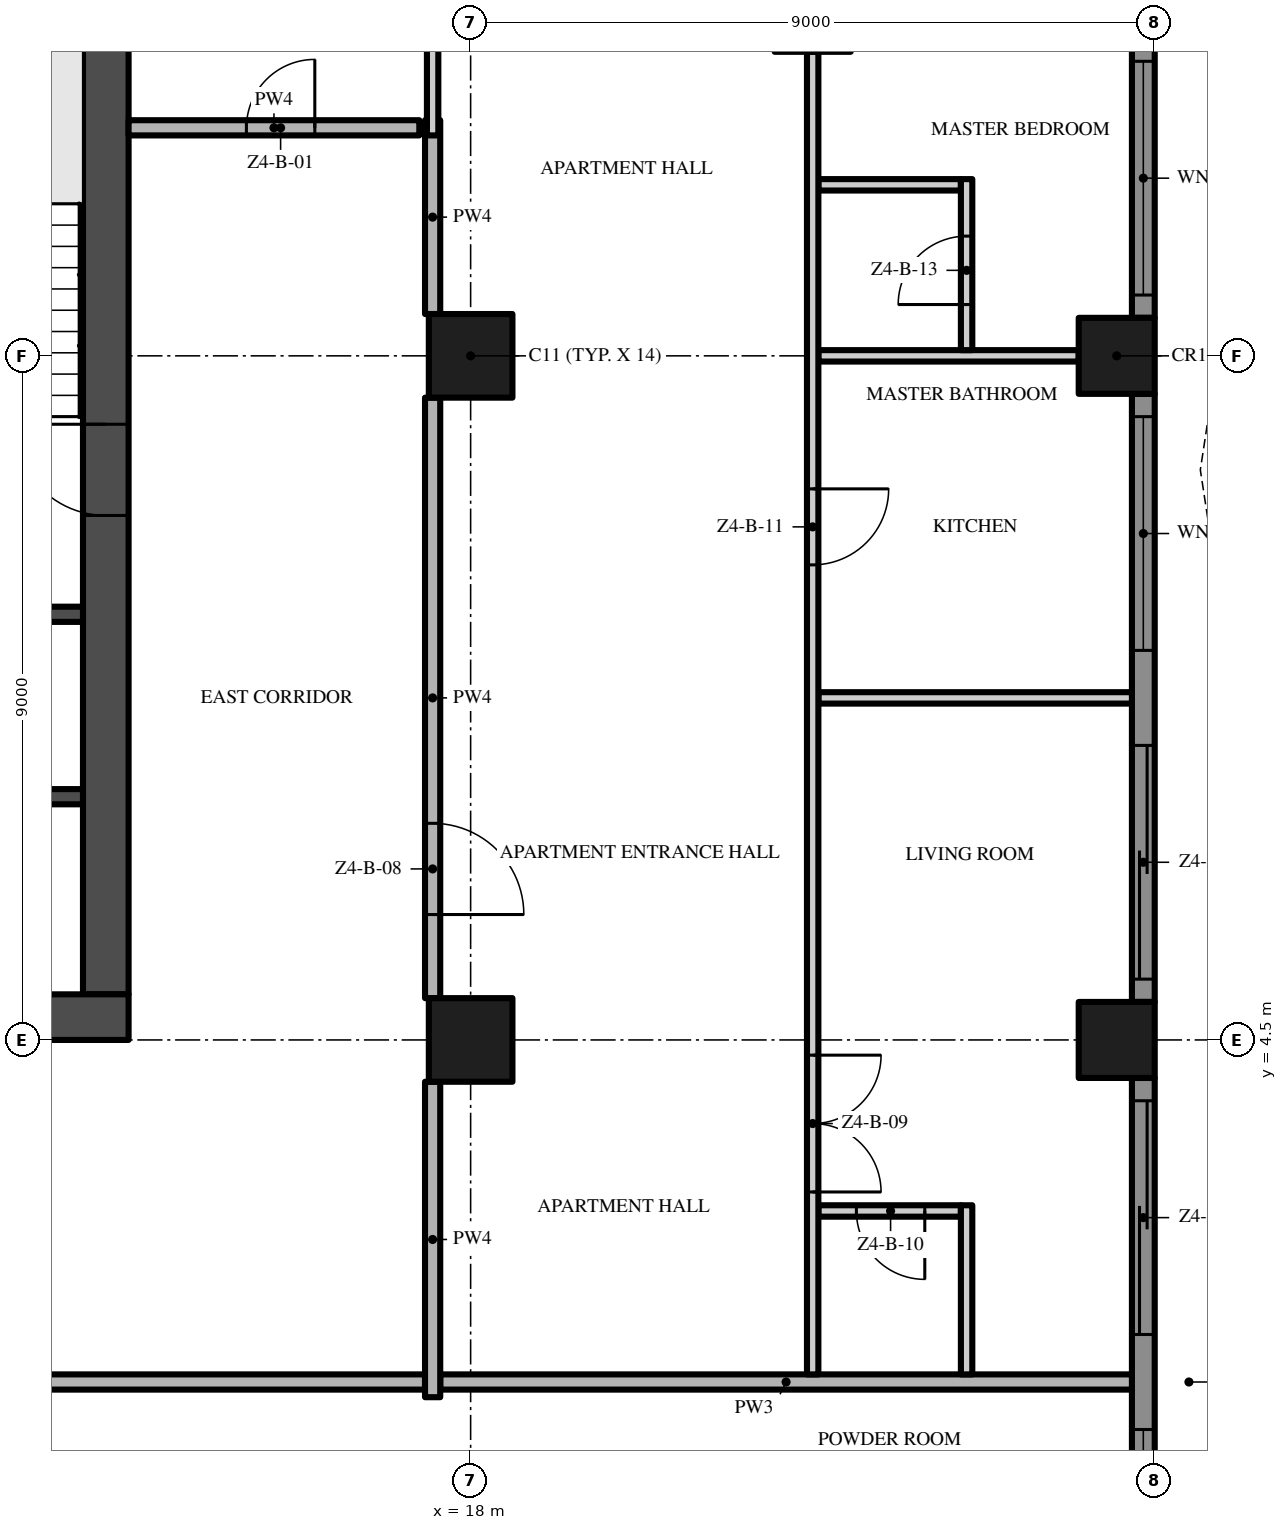
"""IFC4 building model, lengths in metres.
Left out: names, types, materials, properties, quantities, classifications, styles, units other than length and angle.
Written with IfcOpenShell. Run it as: python <this file> out.ifc"""

import sys

from ifc_helpers import new_model, si_unit, direction, frame, frame_2d, origin, origin_2d, place, context, subcontext, project, spatial, polyline, rectangle, outline, extrude, element, fill, save


model = new_model("IFC4")
c1 = context("Model", 3, precision=1e-05, world=origin(), true_north=direction((0.0, 1.0)))
c2 = subcontext(c1, "Body", "Model", "MODEL_VIEW")
j1 = project(units=[si_unit("LENGTHUNIT", "METRE"), si_unit("PLANEANGLEUNIT", "RADIAN")], contexts=[c1])
p1 = place(None, origin())
s1 = spatial("IfcSite", under=j1, at=p1, CompositionType="ELEMENT")
p2 = place(p1, origin())
s2 = spatial("IfcBuilding", under=s1, at=p2, CompositionType="ELEMENT")
p3 = place(p2, frame((0.0, 0.0, 203.4)))
s3 = spatial("IfcBuildingStorey", under=s2, at=p3, CompositionType="ELEMENT", Elevation=203.4)
p4 = place(p3, frame((-13.5, 4.8, -0.3), z_axis=(0.0, 0.0, 1.0), x_axis=(1.0, 0.0, 0.0)))
e1 = element("IfcWall", 1, at=p4, inside=s3, PredefinedType="SHEAR", context=c2, shape_type="SweptSolid", body=[
    extrude(rectangle(XDim=27.0, YDim=0.6, at=frame_2d((13.5, 0.0))), origin(), (0.0, 0.0, 1.0), 3.8),
])
p5 = place(p4, frame((12.0, 0.0, 0.3)))
e2 = element("IfcOpeningElement", 2, at=p5, cuts=e1, PredefinedType="OPENING", context=c2, shape_type="SweptSolid", body=[
    extrude(rectangle(XDim=3.0, YDim=2.4, at=frame_2d((1.5, 1.2))), frame((0.0, 0.31, 0.0), z_axis=(0.0, -1.0, 0.0), x_axis=(1.0, 0.0, 0.0)), (0.0, 0.0, 1.0), 0.62),
])
p6 = place(p4, frame((4.9, 0.0, 0.3)))
e3 = element("IfcOpeningElement", 3, at=p6, cuts=e1, PredefinedType="OPENING", context=c2, shape_type="SweptSolid", body=[
    extrude(rectangle(XDim=1.2, YDim=2.2, at=frame_2d((0.6, 1.1))), frame((0.0, 0.31, 0.0), z_axis=(0.0, -1.0, 0.0), x_axis=(1.0, 0.0, 0.0)), (0.0, 0.0, 1.0), 0.62),
])
p7 = place(p4, frame((20.75, 0.0, 0.3)))
e4 = element("IfcOpeningElement", 4, at=p7, cuts=e1, PredefinedType="OPENING", context=c2, shape_type="SweptSolid", body=[
    extrude(rectangle(XDim=1.5, YDim=2.2, at=frame_2d((0.75, 1.1))), frame((0.0, 0.31, 0.0), z_axis=(0.0, -1.0, 0.0), x_axis=(1.0, 0.0, 0.0)), (0.0, 0.0, 1.0), 0.62),
])
p8 = place(p4, frame((17.4, 0.0, 0.3)))
e5 = element("IfcOpeningElement", 5, at=p8, cuts=e1, PredefinedType="OPENING", context=c2, shape_type="SweptSolid", body=[
    extrude(rectangle(XDim=1.2, YDim=2.2, at=frame_2d((0.6, 1.1))), frame((0.0, 0.31, 0.0), z_axis=(0.0, -1.0, 0.0), x_axis=(1.0, 0.0, 0.0)), (0.0, 0.0, 1.0), 0.62),
])
p9 = place(p3, frame((13.2, 5.1, -0.3), z_axis=(0.0, 0.0, 1.0), x_axis=(0.0, 1.0, 0.0)))
e6 = element("IfcWall", 6, at=p9, inside=s3, PredefinedType="SHEAR", context=c2, shape_type="SweptSolid", body=[
    extrude(rectangle(XDim=16.8, YDim=0.6, at=frame_2d((8.4, 0.0))), origin(), (0.0, 0.0, 1.0), 3.8),
])
p10 = place(p9, frame((6.3, 0.0, 0.3)))
e7 = element("IfcOpeningElement", 7, at=p10, cuts=e6, PredefinedType="OPENING", context=c2, shape_type="SweptSolid", body=[
    extrude(rectangle(XDim=1.2, YDim=2.2, at=frame_2d((0.6, 1.1))), frame((0.0, 0.31, 0.0), z_axis=(0.0, -1.0, 0.0), x_axis=(1.0, 0.0, 0.0)), (0.0, 0.0, 1.0), 0.62),
])
for number, where, z_axis, x_axis in (
    (8, (18.0, 13.5, 0.0), (0.0, 0.0, 1.0), (1.0, 0.0, 0.0)),
    (9, (18.0, 4.5, 0.0), (0.0, 0.0, 1.0), (1.0, 0.0, 0.0)),
):
    element("IfcColumn", number, at=place(p3, frame(where, z_axis=z_axis, x_axis=x_axis)), inside=s3, PredefinedType="COLUMN", context=c2, shape_type="SweptSolid", body=[
        extrude(rectangle(XDim=1.1, YDim=1.1, at=origin_2d()), origin(), (0.0, 0.0, 1.0), 3.5),
    ])
for number, where, z_axis, x_axis in (
    (10, (26.5, 13.5, 0.0), (0.0, 0.0, 1.0), (1.0, 0.0, 0.0)),
    (11, (26.5, 4.5, 0.0), (0.0, 0.0, 1.0), (1.0, 0.0, 0.0)),
):
    element("IfcColumn", number, at=place(p3, frame(where, z_axis=z_axis, x_axis=x_axis)), inside=s3, PredefinedType="COLUMN", context=c2, shape_type="SweptSolid", body=[
        extrude(rectangle(XDim=1.0, YDim=1.0, at=origin_2d()), origin(), (0.0, 0.0, 1.0), 3.5),
    ])
p11 = place(p3, frame((26.85, 4.0, 0.0), z_axis=(0.0, 0.0, 1.0), x_axis=(0.0, -1.0, 0.0)))
e12 = element("IfcWall", 12, at=p11, inside=s3, PredefinedType="SOLIDWALL", context=c2, shape_type="SweptSolid", body=[
    extrude(rectangle(XDim=8.0, YDim=0.3, at=frame_2d((4.0, 0.0))), origin(), (0.0, 0.0, 1.0), 3.5),
])
p12 = place(p11, frame((4.625, 0.0, 0.45)))
e13 = element("IfcOpeningElement", 13, at=p12, cuts=e12, PredefinedType="OPENING", context=c2, shape_type="SweptSolid", body=[
    extrude(rectangle(XDim=3.075, YDim=2.65, at=frame_2d((1.538, 1.325))), frame((0.0, 0.16, 0.0), z_axis=(0.0, -1.0, 0.0), x_axis=(1.0, 0.0, 0.0)), (0.0, 0.0, 1.0), 0.32),
])
p13 = place(p11, frame((0.3, 0.0, 0.0)))
e14 = element("IfcOpeningElement", 14, at=p13, cuts=e12, PredefinedType="OPENING", context=c2, shape_type="SweptSolid", body=[
    extrude(rectangle(XDim=3.075, YDim=2.4, at=frame_2d((1.538, 1.2))), frame((0.0, 0.16, 0.0), z_axis=(0.0, -1.0, 0.0), x_axis=(1.0, 0.0, 0.0)), (0.0, 0.0, 1.0), 0.32),
])
p14 = place(p3, frame((26.85, 13.0, 0.0), z_axis=(0.0, 0.0, 1.0), x_axis=(0.0, -1.0, 0.0)))
e15 = element("IfcWall", 15, at=p14, inside=s3, PredefinedType="SOLIDWALL", context=c2, shape_type="SweptSolid", body=[
    extrude(rectangle(XDim=8.0, YDim=0.3, at=frame_2d((4.0, 0.0))), origin(), (0.0, 0.0, 1.0), 3.5),
])
p15 = place(p14, frame((4.625, 0.0, 0.0)))
e16 = element("IfcOpeningElement", 16, at=p15, cuts=e15, PredefinedType="OPENING", context=c2, shape_type="SweptSolid", body=[
    extrude(rectangle(XDim=3.075, YDim=2.4, at=frame_2d((1.538, 1.2))), frame((0.0, 0.16, 0.0), z_axis=(0.0, -1.0, 0.0), x_axis=(1.0, 0.0, 0.0)), (0.0, 0.0, 1.0), 0.32),
])
p16 = place(p14, frame((0.3, 0.0, 0.45)))
e17 = element("IfcOpeningElement", 17, at=p16, cuts=e15, PredefinedType="OPENING", context=c2, shape_type="SweptSolid", body=[
    extrude(rectangle(XDim=3.075, YDim=2.65, at=frame_2d((1.538, 1.325))), frame((0.0, 0.16, 0.0), z_axis=(0.0, -1.0, 0.0), x_axis=(1.0, 0.0, 0.0)), (0.0, 0.0, 1.0), 0.32),
])
p17 = place(p3, frame((26.85, 18.0, 0.0), z_axis=(0.0, 0.0, 1.0), x_axis=(0.0, -1.0, 0.0)))
e18 = element("IfcWall", 18, at=p17, inside=s3, PredefinedType="SOLIDWALL", context=c2, shape_type="SweptSolid", body=[
    extrude(rectangle(XDim=4.0, YDim=0.3, at=frame_2d((2.0, 0.0))), origin(), (0.0, 0.0, 1.0), 3.5),
])
p18 = place(p17, frame((0.625, 0.0, 0.45)))
e19 = element("IfcOpeningElement", 19, at=p18, cuts=e18, PredefinedType="OPENING", context=c2, shape_type="SweptSolid", body=[
    extrude(rectangle(XDim=3.075, YDim=2.65, at=frame_2d((1.538, 1.325))), frame((0.0, 0.16, 0.0), z_axis=(0.0, -1.0, 0.0), x_axis=(1.0, 0.0, 0.0)), (0.0, 0.0, 1.0), 0.32),
])
p19 = place(p3, origin())
e20 = element("IfcWall", 20, at=p19, inside=s3, PredefinedType="USERDEFINED", context=c2, shape_type="SweptSolid", body=[
    extrude(outline(polyline([(27.6, -18.0), (27.829, -16.5), (28.429, -15.0), (29.171, -13.5), (29.771, -12.0), (30.0, -10.5), (29.771, -9.0), (29.171, -7.5), (28.429, -6.0), (27.829, -4.5), (27.6, -3.0), (27.829, -1.5), (28.429, 0.0), (29.171, 1.5), (29.771, 3.0), (30.0, 4.5), (29.771, 6.0), (29.171, 7.5), (28.429, 9.0), (27.829, 10.5), (27.6, 12.0), (27.829, 13.5), (28.429, 15.0), (29.171, 16.5), (29.771, 18.0), (29.539, 18.093), (28.942, 16.602), (28.201, 15.102), (27.586, 13.566), (27.347, 12.0), (27.586, 10.434), (28.201, 8.898), (28.942, 7.398), (29.528, 5.934), (29.747, 4.5), (29.528, 3.066), (28.942, 1.602), (28.201, 0.102), (27.586, -1.434), (27.347, -3.0), (27.586, -4.566), (28.201, -6.102), (28.942, -7.602), (29.528, -9.066), (29.747, -10.5), (29.528, -11.934), (28.942, -13.398), (28.201, -14.898), (27.586, -16.434), (27.353, -17.962), (27.6, -18.0)])), origin(), (0.0, 0.0, 1.0), 0.9),
])
for number, where, z_axis, x_axis in (
    (21, (9.65, 7.7, 0.0), (0.0, 0.0, 1.0), (1.0, 0.0, 0.0)),
    (22, (9.65, 10.1, 0.0), (0.0, 0.0, 1.0), (1.0, 0.0, 0.0)),
):
    element("IfcWall", number, at=place(p3, frame(where, z_axis=z_axis, x_axis=x_axis)), inside=s3, PredefinedType="SHEAR", context=c2, shape_type="SweptSolid", body=[
        extrude(rectangle(XDim=3.25, YDim=0.2, at=frame_2d((1.625, 0.0))), origin(), (0.0, 0.0, 1.0), 3.5),
    ])
p20 = place(p3, frame((17.4, 0.0, 0.0), z_axis=(0.0, 0.0, 1.0), x_axis=(-1.0, 0.0, 0.0)))
e23 = element("IfcWall", 23, at=p20, inside=s3, PredefinedType="PARTITIONING", context=c2, shape_type="SweptSolid", body=[
    extrude(rectangle(XDim=17.3, YDim=0.2, at=frame_2d((8.65, 0.0))), origin(), (0.0, 0.0, 1.0), 3.5),
])
p21 = place(p20, frame((7.65, 0.0, 0.0)))
e24 = element("IfcOpeningElement", 24, at=p21, cuts=e23, PredefinedType="OPENING", context=c2, shape_type="SweptSolid", body=[
    extrude(rectangle(XDim=1.5, YDim=2.4, at=frame_2d((0.75, 1.2))), frame((0.0, 0.11, 0.0), z_axis=(0.0, -1.0, 0.0), x_axis=(1.0, 0.0, 0.0)), (0.0, 0.0, 1.0), 0.22),
])
p22 = place(p3, frame((17.6, 0.0, 0.0), z_axis=(0.0, 0.0, 1.0), x_axis=(1.0, 0.0, 0.0)))
e25 = element("IfcWall", 25, at=p22, inside=s3, PredefinedType="PARTITIONING", context=c2, shape_type="SweptSolid", body=[
    extrude(rectangle(XDim=9.1, YDim=0.2, at=frame_2d((4.55, 0.0))), origin(), (0.0, 0.0, 1.0), 3.5),
])
p23 = place(p3, frame((24.45, 2.25, 0.0), z_axis=(0.0, 0.0, 1.0), x_axis=(-1.0, 0.0, 0.0)))
e26 = element("IfcWall", 26, at=p23, inside=s3, PredefinedType="PARTITIONING", context=c2, shape_type="SweptSolid", body=[
    extrude(rectangle(XDim=1.875, YDim=0.15, at=frame_2d((0.938, 0.0))), origin(), (0.0, 0.0, 1.0), 3.5),
])
p24 = place(p23, frame((0.475, 0.0, 0.0)))
e27 = element("IfcOpeningElement", 27, at=p24, cuts=e26, PredefinedType="OPENING", context=c2, shape_type="SweptSolid", body=[
    extrude(rectangle(XDim=0.9, YDim=2.1, at=frame_2d((0.45, 1.05))), frame((0.0, 0.085, 0.0), z_axis=(0.0, -1.0, 0.0), x_axis=(1.0, 0.0, 0.0)), (0.0, 0.0, 1.0), 0.17),
])
p25 = place(p3, frame((22.575, 9.0, 0.0), z_axis=(0.0, 0.0, 1.0), x_axis=(1.0, 0.0, 0.0)))
e28 = element("IfcWall", 28, at=p25, inside=s3, PredefinedType="PARTITIONING", context=c2, shape_type="SweptSolid", body=[
    extrude(rectangle(XDim=4.125, YDim=0.15, at=frame_2d((2.062, 0.0))), origin(), (0.0, 0.0, 1.0), 3.5),
])
p26 = place(p3, frame((22.575, 13.5, 0.0), z_axis=(0.0, 0.0, 1.0), x_axis=(1.0, 0.0, 0.0)))
e29 = element("IfcWall", 29, at=p26, inside=s3, PredefinedType="PARTITIONING", context=c2, shape_type="SweptSolid", body=[
    extrude(rectangle(XDim=3.425, YDim=0.15, at=frame_2d((1.712, 0.0))), origin(), (0.0, 0.0, 1.0), 3.5),
])
p27 = place(p3, frame((22.575, 15.75, 0.0), z_axis=(0.0, 0.0, 1.0), x_axis=(1.0, 0.0, 0.0)))
e30 = element("IfcWall", 30, at=p27, inside=s3, PredefinedType="PARTITIONING", context=c2, shape_type="SweptSolid", body=[
    extrude(rectangle(XDim=1.875, YDim=0.15, at=frame_2d((0.938, 0.0))), origin(), (0.0, 0.0, 1.0), 3.5),
])
p28 = place(p3, frame((13.5, 16.5, 0.0), z_axis=(0.0, 0.0, 1.0), x_axis=(1.0, 0.0, 0.0)))
e31 = element("IfcWall", 31, at=p28, inside=s3, PredefinedType="PARTITIONING", context=c2, shape_type="SweptSolid", body=[
    extrude(rectangle(XDim=3.825, YDim=0.2, at=frame_2d((1.913, 0.0))), origin(), (0.0, 0.0, 1.0), 3.5),
])
p29 = place(p28, frame((1.55, 0.0, 0.0)))
e32 = element("IfcOpeningElement", 32, at=p29, cuts=e31, PredefinedType="OPENING", context=c2, shape_type="SweptSolid", body=[
    extrude(rectangle(XDim=0.9, YDim=2.1, at=frame_2d((0.45, 1.05))), frame((0.0, 0.11, 0.0), z_axis=(0.0, -1.0, 0.0), x_axis=(1.0, 0.0, 0.0)), (0.0, 0.0, 1.0), 0.22),
])
p30 = place(p3, frame((17.5, -0.2, 0.0), z_axis=(0.0, 0.0, 1.0), x_axis=(0.0, 1.0, 0.0)))
e33 = element("IfcWall", 33, at=p30, inside=s3, PredefinedType="PARTITIONING", context=c2, shape_type="SweptSolid", body=[
    extrude(rectangle(XDim=4.15, YDim=0.2, at=frame_2d((2.075, 0.0))), origin(), (0.0, 0.0, 1.0), 3.5),
])
p31 = place(p3, frame((17.5, 12.95, 0.0), z_axis=(0.0, 0.0, 1.0), x_axis=(0.0, -1.0, 0.0)))
e34 = element("IfcWall", 34, at=p31, inside=s3, PredefinedType="PARTITIONING", context=c2, shape_type="SweptSolid", body=[
    extrude(rectangle(XDim=7.9, YDim=0.2, at=frame_2d((3.95, 0.0))), origin(), (0.0, 0.0, 1.0), 3.5),
])
p32 = place(p31, frame((5.6, 0.0, 0.0)))
e35 = element("IfcOpeningElement", 35, at=p32, cuts=e34, PredefinedType="OPENING", context=c2, shape_type="SweptSolid", body=[
    extrude(rectangle(XDim=1.2, YDim=2.4, at=frame_2d((0.6, 1.2))), frame((0.0, 0.11, 0.0), z_axis=(0.0, -1.0, 0.0), x_axis=(1.0, 0.0, 0.0)), (0.0, 0.0, 1.0), 0.22),
])
p33 = place(p3, frame((17.5, 14.05, 0.0), z_axis=(0.0, 0.0, 1.0), x_axis=(0.0, 1.0, 0.0)))
e36 = element("IfcWall", 36, at=p33, inside=s3, PredefinedType="PARTITIONING", context=c2, shape_type="SweptSolid", body=[
    extrude(rectangle(XDim=2.55, YDim=0.2, at=frame_2d((1.275, 0.0))), origin(), (0.0, 0.0, 1.0), 3.5),
])
p34 = place(p3, frame((17.5, 16.4, 0.0), z_axis=(0.0, 0.0, 1.0), x_axis=(0.0, 1.0, 0.0)))
e37 = element("IfcWall", 37, at=p34, inside=s3, PredefinedType="PARTITIONING", context=c2, shape_type="SweptSolid", body=[
    extrude(rectangle(XDim=5.1, YDim=0.15, at=frame_2d((2.55, 0.0))), origin(), (0.0, 0.0, 1.0), 3.5),
])
p35 = place(p3, frame((22.5, 17.5, 0.0), z_axis=(0.0, 0.0, 1.0), x_axis=(0.0, -1.0, 0.0)))
e38 = element("IfcWall", 38, at=p35, inside=s3, PredefinedType="PARTITIONING", context=c2, shape_type="SweptSolid", body=[
    extrude(rectangle(XDim=17.4, YDim=0.15, at=frame_2d((8.7, 0.0))), origin(), (0.0, 0.0, 1.0), 3.5),
])
p36 = place(p35, frame((13.2, 0.0, 0.0)))
e39 = element("IfcOpeningElement", 39, at=p36, cuts=e38, PredefinedType="OPENING", context=c2, shape_type="SweptSolid", body=[
    extrude(rectangle(XDim=1.8, YDim=2.4, at=frame_2d((0.9, 1.2))), frame((0.0, 0.085, 0.0), z_axis=(0.0, -1.0, 0.0), x_axis=(1.0, 0.0, 0.0)), (0.0, 0.0, 1.0), 0.17),
])
p37 = place(p35, frame((5.75, 0.0, 0.0)))
e40 = element("IfcOpeningElement", 40, at=p37, cuts=e38, PredefinedType="OPENING", context=c2, shape_type="SweptSolid", body=[
    extrude(rectangle(XDim=1.0, YDim=2.4, at=frame_2d((0.5, 1.2))), frame((0.0, 0.085, 0.0), z_axis=(0.0, -1.0, 0.0), x_axis=(1.0, 0.0, 0.0)), (0.0, 0.0, 1.0), 0.17),
])
p38 = place(p3, frame((24.525, 0.1, 0.0), z_axis=(0.0, 0.0, 1.0), x_axis=(0.0, 1.0, 0.0)))
e41 = element("IfcWall", 41, at=p38, inside=s3, PredefinedType="PARTITIONING", context=c2, shape_type="SweptSolid", body=[
    extrude(rectangle(XDim=2.225, YDim=0.15, at=frame_2d((1.113, 0.0))), origin(), (0.0, 0.0, 1.0), 3.5),
])
p39 = place(p3, frame((24.525, 13.575, 0.0), z_axis=(0.0, 0.0, 1.0), x_axis=(0.0, 1.0, 0.0)))
e42 = element("IfcWall", 42, at=p39, inside=s3, PredefinedType="PARTITIONING", context=c2, shape_type="SweptSolid", body=[
    extrude(rectangle(XDim=2.25, YDim=0.15, at=frame_2d((1.125, 0.0))), origin(), (0.0, 0.0, 1.0), 3.5),
])
p40 = place(p39, frame((0.6, 0.0, 0.0)))
e43 = element("IfcOpeningElement", 43, at=p40, cuts=e42, PredefinedType="OPENING", context=c2, shape_type="SweptSolid", body=[
    extrude(rectangle(XDim=0.9, YDim=2.1, at=frame_2d((0.45, 1.05))), frame((0.0, 0.085, 0.0), z_axis=(0.0, -1.0, 0.0), x_axis=(1.0, 0.0, 0.0)), (0.0, 0.0, 1.0), 0.17),
])
p41 = place(p12, origin())
e44 = element("IfcWindow", 44, at=p41, inside=s3, PartitioningType="SINGLE_PANEL", PredefinedType="WINDOW", context=c2, shape_type="SweptSolid", body=[
    extrude(rectangle(XDim=3.075, YDim=2.65, at=frame_2d((1.538, 1.325))), frame((0.0, 0.03, 0.0), z_axis=(0.0, -1.0, 0.0), x_axis=(1.0, 0.0, 0.0)), (0.0, 0.0, 1.0), 0.06),
])
fill(e13, e44)
p42 = place(p13, origin())
e45 = element("IfcDoor", 45, at=p42, inside=s3, OperationType="SINGLE_SWING_LEFT", PredefinedType="DOOR", context=c2, shape_type="SweptSolid", body=[
    extrude(rectangle(XDim=3.075, YDim=2.4, at=frame_2d((1.538, 1.2))), frame((0.0, 0.025, 0.0), z_axis=(0.0, -1.0, 0.0), x_axis=(1.0, 0.0, 0.0)), (0.0, 0.0, 1.0), 0.05),
])
fill(e14, e45)
p43 = place(p15, origin())
e46 = element("IfcDoor", 46, at=p43, inside=s3, OperationType="SINGLE_SWING_LEFT", PredefinedType="DOOR", context=c2, shape_type="SweptSolid", body=[
    extrude(rectangle(XDim=3.075, YDim=2.4, at=frame_2d((1.538, 1.2))), frame((0.0, 0.025, 0.0), z_axis=(0.0, -1.0, 0.0), x_axis=(1.0, 0.0, 0.0)), (0.0, 0.0, 1.0), 0.05),
])
fill(e16, e46)
p44 = place(p16, origin())
e47 = element("IfcWindow", 47, at=p44, inside=s3, PartitioningType="SINGLE_PANEL", PredefinedType="WINDOW", context=c2, shape_type="SweptSolid", body=[
    extrude(rectangle(XDim=3.075, YDim=2.65, at=frame_2d((1.538, 1.325))), frame((0.0, 0.03, 0.0), z_axis=(0.0, -1.0, 0.0), x_axis=(1.0, 0.0, 0.0)), (0.0, 0.0, 1.0), 0.06),
])
fill(e17, e47)
p45 = place(p18, origin())
e48 = element("IfcWindow", 48, at=p45, inside=s3, PartitioningType="SINGLE_PANEL", PredefinedType="WINDOW", context=c2, shape_type="SweptSolid", body=[
    extrude(rectangle(XDim=3.075, YDim=2.65, at=frame_2d((1.538, 1.325))), frame((0.0, 0.03, 0.0), z_axis=(0.0, -1.0, 0.0), x_axis=(1.0, 0.0, 0.0)), (0.0, 0.0, 1.0), 0.06),
])
fill(e19, e48)
p46 = place(p10, frame((1.2, 0.0, 0.0), z_axis=(0.0, 0.0, 1.0), x_axis=(-1.0, 0.0, 0.0)))
e49 = element("IfcDoor", 49, at=p46, inside=s3, OperationType="SINGLE_SWING_LEFT", PredefinedType="DOOR", context=c2, shape_type="SweptSolid", body=[
    extrude(rectangle(XDim=1.2, YDim=2.2, at=frame_2d((0.6, 1.1))), frame((0.0, 0.025, 0.0), z_axis=(0.0, -1.0, 0.0), x_axis=(1.0, 0.0, 0.0)), (0.0, 0.0, 1.0), 0.05),
])
fill(e7, e49)
p47 = place(p29, origin())
e50 = element("IfcDoor", 50, at=p47, inside=s3, OperationType="SINGLE_SWING_RIGHT", PredefinedType="DOOR", context=c2, shape_type="SweptSolid", body=[
    extrude(rectangle(XDim=0.9, YDim=2.1, at=frame_2d((0.45, 1.05))), frame((0.0, 0.025, 0.0), z_axis=(0.0, -1.0, 0.0), x_axis=(1.0, 0.0, 0.0)), (0.0, 0.0, 1.0), 0.05),
])
fill(e32, e50)
p48 = place(p32, origin())
e51 = element("IfcDoor", 51, at=p48, inside=s3, OperationType="SINGLE_SWING_RIGHT", PredefinedType="DOOR", context=c2, shape_type="SweptSolid", body=[
    extrude(rectangle(XDim=1.2, YDim=2.4, at=frame_2d((0.6, 1.2))), frame((0.0, 0.025, 0.0), z_axis=(0.0, -1.0, 0.0), x_axis=(1.0, 0.0, 0.0)), (0.0, 0.0, 1.0), 0.05),
])
fill(e35, e51)
p49 = place(p36, origin())
e52 = element("IfcDoor", 52, at=p49, inside=s3, OperationType="DOUBLE_DOOR_SINGLE_SWING", PredefinedType="DOOR", context=c2, shape_type="SweptSolid", body=[
    extrude(rectangle(XDim=1.8, YDim=2.4, at=frame_2d((0.9, 1.2))), frame((0.0, 0.025, 0.0), z_axis=(0.0, -1.0, 0.0), x_axis=(1.0, 0.0, 0.0)), (0.0, 0.0, 1.0), 0.05),
])
fill(e39, e52)
p50 = place(p24, origin())
e53 = element("IfcDoor", 53, at=p50, inside=s3, OperationType="SINGLE_SWING_LEFT", PredefinedType="DOOR", context=c2, shape_type="SweptSolid", body=[
    extrude(rectangle(XDim=0.9, YDim=2.1, at=frame_2d((0.45, 1.05))), frame((0.0, 0.025, 0.0), z_axis=(0.0, -1.0, 0.0), x_axis=(1.0, 0.0, 0.0)), (0.0, 0.0, 1.0), 0.05),
])
fill(e27, e53)
p51 = place(p37, origin())
e54 = element("IfcDoor", 54, at=p51, inside=s3, OperationType="SINGLE_SWING_LEFT", PredefinedType="DOOR", context=c2, shape_type="SweptSolid", body=[
    extrude(rectangle(XDim=1.0, YDim=2.4, at=frame_2d((0.5, 1.2))), frame((0.0, 0.025, 0.0), z_axis=(0.0, -1.0, 0.0), x_axis=(1.0, 0.0, 0.0)), (0.0, 0.0, 1.0), 0.05),
])
fill(e40, e54)
p52 = place(p40, origin())
e55 = element("IfcDoor", 55, at=p52, inside=s3, OperationType="SINGLE_SWING_LEFT", PredefinedType="DOOR", context=c2, shape_type="SweptSolid", body=[
    extrude(rectangle(XDim=0.9, YDim=2.1, at=frame_2d((0.45, 1.05))), frame((0.0, 0.025, 0.0), z_axis=(0.0, -1.0, 0.0), x_axis=(1.0, 0.0, 0.0)), (0.0, 0.0, 1.0), 0.05),
])
fill(e43, e55)
save(model, sys.argv[1])
